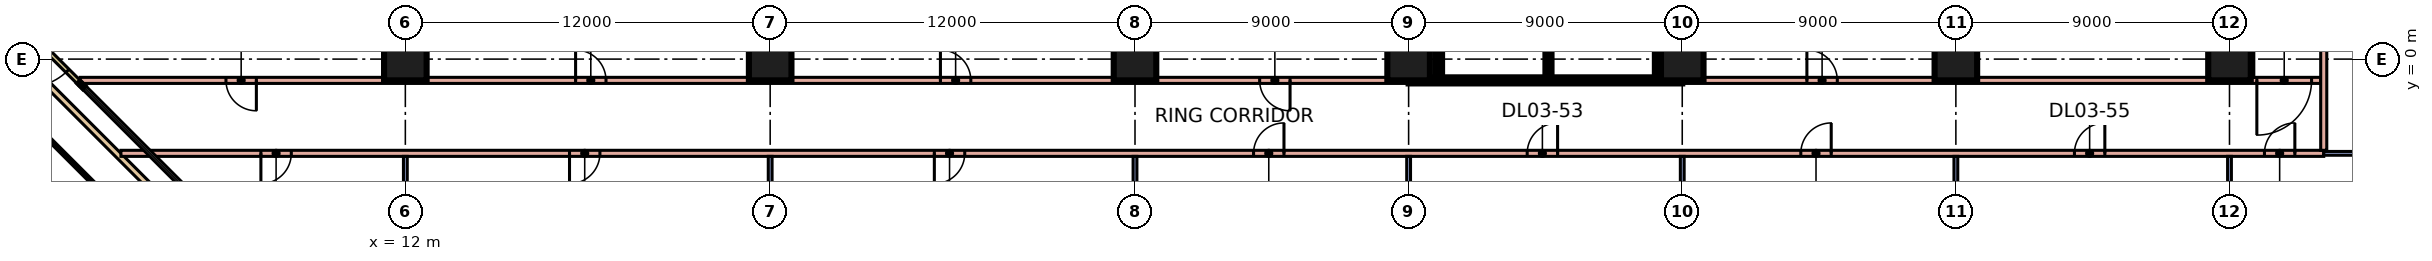
"""IFC4 building model, lengths in metres.
Left out: names, types, materials, properties, quantities, classifications, styles, units other than length and angle.
Written with IfcOpenShell. Run it as: python <this file> out.ifc"""

import sys

from ifc_helpers import new_model, si_unit, direction, frame, frame_2d, origin, origin_2d, place, context, subcontext, project, spatial, rectangle, extrude, element, fill, save


model = new_model("IFC4")
c1 = context("Model", 3, precision=1e-05, world=origin(), true_north=direction((0.0, 1.0)))
c2 = subcontext(c1, "Body", "Model", "MODEL_VIEW")
j1 = project(units=[si_unit("LENGTHUNIT", "METRE"), si_unit("PLANEANGLEUNIT", "RADIAN")], contexts=[c1])
p1 = place(None, origin())
s1 = spatial("IfcSite", under=j1, at=p1, CompositionType="ELEMENT")
p2 = place(p1, origin())
s2 = spatial("IfcBuilding", under=s1, at=p2, CompositionType="ELEMENT")
p3 = place(p2, frame((0.0, 0.0, 16.8)))
s3 = spatial("IfcBuildingStorey", under=s2, at=p3, CompositionType="ELEMENT", Elevation=16.8)
for number, where, z_axis, x_axis in (
    (1, (12.0, 0.0, 0.0), (0.0, 0.0, 1.0), (1.0, 0.0, 0.0)),
    (2, (24.0, 0.0, 0.0), (0.0, 0.0, 1.0), (1.0, 0.0, 0.0)),
    (3, (36.0, 0.0, 0.0), (0.0, 0.0, 1.0), (1.0, 0.0, 0.0)),
    (4, (45.0, 0.0, 0.0), (0.0, 0.0, 1.0), (1.0, 0.0, 0.0)),
    (5, (54.0, 0.0, 0.0), (0.0, 0.0, 1.0), (1.0, 0.0, 0.0)),
    (6, (63.0, 0.0, 0.0), (0.0, 0.0, 1.0), (1.0, 0.0, 0.0)),
    (7, (72.0, 0.0, 0.0), (0.0, 0.0, 1.0), (1.0, 0.0, 0.0)),
):
    element("IfcColumn", number, at=place(p3, frame(where, z_axis=z_axis, x_axis=x_axis)), inside=s3, PredefinedType="COLUMN", context=c2, shape_type="SweptSolid", body=[
        extrude(rectangle(XDim=1.4, YDim=1.4, at=origin_2d()), origin(), (0.0, 0.0, 1.0), 4.8),
    ])
p4 = place(p3, frame((-0.811, 1.31, 0.0), z_axis=(0.0, 0.0, 1.0), x_axis=(0.707106781187, -0.707106781187, 0.0)))
e8 = element("IfcWall", 8, at=p4, inside=s3, PredefinedType="SOLIDWALL", context=c2, shape_type="SweptSolid", body=[
    extrude(rectangle(XDim=3.0, YDim=0.15, at=frame_2d((1.5, 0.0))), origin(), (0.0, 0.0, 1.0), 4.4),
])
p5 = place(p4, frame((0.6, 0.0, 0.0)))
e9 = element("IfcOpeningElement", 9, at=p5, cuts=e8, PredefinedType="OPENING", context=c2, shape_type="SweptSolid", body=[
    extrude(rectangle(XDim=1.8, YDim=2.4, at=frame_2d((0.9, 1.2))), frame((0.0, 0.085, 0.0), z_axis=(0.0, -1.0, 0.0), x_axis=(1.0, 0.0, 0.0)), (0.0, 0.0, 1.0), 0.17),
])
p6 = place(p3, frame((81.7, -1.896, 0.0), z_axis=(0.0, 0.0, 1.0), x_axis=(-0.707106781187, -0.707106781187, 0.0)))
e10 = element("IfcWall", 10, at=p6, inside=s3, PredefinedType="PARAPET", context=c2, shape_type="SweptSolid", body=[
    extrude(rectangle(XDim=11.036, YDim=0.2, at=frame_2d((5.518, 0.0))), origin(), (0.0, 0.0, 1.0), 0.5),
])
p7 = place(p3, frame((9.104, -9.7, 0.0), z_axis=(0.0, 0.0, 1.0), x_axis=(-0.707106781187, 0.707106781187, 0.0)))
e11 = element("IfcWall", 11, at=p7, inside=s3, PredefinedType="PARAPET", context=c2, shape_type="SweptSolid", body=[
    extrude(rectangle(XDim=26.592, YDim=0.2, at=frame_2d((13.296, 0.0))), origin(), (0.0, 0.0, 1.0), 0.5),
])
p8 = place(p3, frame((1.304, -0.7, 0.0), z_axis=(0.0, 0.0, 1.0), x_axis=(1.0, 0.0, 0.0)))
e12 = element("IfcWall", 12, at=p8, inside=s3, PredefinedType="PARTITIONING", context=c2, shape_type="SweptSolid", body=[
    extrude(rectangle(XDim=43.696, YDim=0.2, at=frame_2d((21.848, 0.0))), origin(), (0.0, 0.0, 1.0), 4.4),
])
p9 = place(p8, frame((38.796, 0.0, 0.0)))
e13 = element("IfcOpeningElement", 13, at=p9, cuts=e12, PredefinedType="OPENING", context=c2, shape_type="SweptSolid", body=[
    extrude(rectangle(XDim=1.0, YDim=2.1, at=frame_2d((0.5, 1.05))), frame((0.0, 0.11, 0.0), z_axis=(0.0, -1.0, 0.0), x_axis=(1.0, 0.0, 0.0)), (0.0, 0.0, 1.0), 0.22),
])
p10 = place(p8, frame((4.796, 0.0, 0.0)))
e14 = element("IfcOpeningElement", 14, at=p10, cuts=e12, PredefinedType="OPENING", context=c2, shape_type="SweptSolid", body=[
    extrude(rectangle(XDim=1.0, YDim=2.1, at=frame_2d((0.5, 1.05))), frame((0.0, 0.11, 0.0), z_axis=(0.0, -1.0, 0.0), x_axis=(1.0, 0.0, 0.0)), (0.0, 0.0, 1.0), 0.22),
])
p11 = place(p8, frame((16.296, 0.0, 0.0)))
e15 = element("IfcOpeningElement", 15, at=p11, cuts=e12, PredefinedType="OPENING", context=c2, shape_type="SweptSolid", body=[
    extrude(rectangle(XDim=1.0, YDim=2.1, at=frame_2d((0.5, 1.05))), frame((0.0, 0.11, 0.0), z_axis=(0.0, -1.0, 0.0), x_axis=(1.0, 0.0, 0.0)), (0.0, 0.0, 1.0), 0.22),
])
p12 = place(p8, frame((28.296, 0.0, 0.0)))
e16 = element("IfcOpeningElement", 16, at=p12, cuts=e12, PredefinedType="OPENING", context=c2, shape_type="SweptSolid", body=[
    extrude(rectangle(XDim=1.0, YDim=2.1, at=frame_2d((0.5, 1.05))), frame((0.0, 0.11, 0.0), z_axis=(0.0, -1.0, 0.0), x_axis=(1.0, 0.0, 0.0)), (0.0, 0.0, 1.0), 0.22),
])
p13 = place(p3, frame((2.645, -3.1, 0.0), z_axis=(0.0, 0.0, 1.0), x_axis=(1.0, 0.0, 0.0)))
e17 = element("IfcWall", 17, at=p13, inside=s3, PredefinedType="PARTITIONING", context=c2, shape_type="SweptSolid", body=[
    extrude(rectangle(XDim=72.455, YDim=0.2, at=frame_2d((36.228, 0.0))), origin(), (0.0, 0.0, 1.0), 4.4),
])
p14 = place(p13, frame((4.604, 0.0, 0.0)))
e18 = element("IfcOpeningElement", 18, at=p14, cuts=e17, PredefinedType="OPENING", context=c2, shape_type="SweptSolid", body=[
    extrude(rectangle(XDim=1.0, YDim=2.1, at=frame_2d((0.5, 1.05))), frame((0.0, 0.11, 0.0), z_axis=(0.0, -1.0, 0.0), x_axis=(1.0, 0.0, 0.0)), (0.0, 0.0, 1.0), 0.22),
])
p15 = place(p13, frame((14.755, 0.0, 0.0)))
e19 = element("IfcOpeningElement", 19, at=p15, cuts=e17, PredefinedType="OPENING", context=c2, shape_type="SweptSolid", body=[
    extrude(rectangle(XDim=1.0, YDim=2.1, at=frame_2d((0.5, 1.05))), frame((0.0, 0.11, 0.0), z_axis=(0.0, -1.0, 0.0), x_axis=(1.0, 0.0, 0.0)), (0.0, 0.0, 1.0), 0.22),
])
p16 = place(p13, frame((26.755, 0.0, 0.0)))
e20 = element("IfcOpeningElement", 20, at=p16, cuts=e17, PredefinedType="OPENING", context=c2, shape_type="SweptSolid", body=[
    extrude(rectangle(XDim=1.0, YDim=2.1, at=frame_2d((0.5, 1.05))), frame((0.0, 0.11, 0.0), z_axis=(0.0, -1.0, 0.0), x_axis=(1.0, 0.0, 0.0)), (0.0, 0.0, 1.0), 0.22),
])
p17 = place(p13, frame((37.255, 0.0, 0.0)))
e21 = element("IfcOpeningElement", 21, at=p17, cuts=e17, PredefinedType="OPENING", context=c2, shape_type="SweptSolid", body=[
    extrude(rectangle(XDim=1.0, YDim=2.1, at=frame_2d((0.5, 1.05))), frame((0.0, 0.11, 0.0), z_axis=(0.0, -1.0, 0.0), x_axis=(1.0, 0.0, 0.0)), (0.0, 0.0, 1.0), 0.22),
])
p18 = place(p13, frame((46.255, 0.0, 0.0)))
e22 = element("IfcOpeningElement", 22, at=p18, cuts=e17, PredefinedType="OPENING", context=c2, shape_type="SweptSolid", body=[
    extrude(rectangle(XDim=1.0, YDim=2.1, at=frame_2d((0.5, 1.05))), frame((0.0, 0.11, 0.0), z_axis=(0.0, -1.0, 0.0), x_axis=(1.0, 0.0, 0.0)), (0.0, 0.0, 1.0), 0.22),
])
p19 = place(p13, frame((55.255, 0.0, 0.0)))
e23 = element("IfcOpeningElement", 23, at=p19, cuts=e17, PredefinedType="OPENING", context=c2, shape_type="SweptSolid", body=[
    extrude(rectangle(XDim=1.0, YDim=2.1, at=frame_2d((0.5, 1.05))), frame((0.0, 0.11, 0.0), z_axis=(0.0, -1.0, 0.0), x_axis=(1.0, 0.0, 0.0)), (0.0, 0.0, 1.0), 0.22),
])
p20 = place(p13, frame((64.255, 0.0, 0.0)))
e24 = element("IfcOpeningElement", 24, at=p20, cuts=e17, PredefinedType="OPENING", context=c2, shape_type="SweptSolid", body=[
    extrude(rectangle(XDim=1.0, YDim=2.1, at=frame_2d((0.5, 1.05))), frame((0.0, 0.11, 0.0), z_axis=(0.0, -1.0, 0.0), x_axis=(1.0, 0.0, 0.0)), (0.0, 0.0, 1.0), 0.22),
])
p21 = place(p13, frame((70.505, 0.0, 0.0)))
e25 = element("IfcOpeningElement", 25, at=p21, cuts=e17, PredefinedType="OPENING", context=c2, shape_type="SweptSolid", body=[
    extrude(rectangle(XDim=1.0, YDim=2.1, at=frame_2d((0.5, 1.05))), frame((0.0, 0.11, 0.0), z_axis=(0.0, -1.0, 0.0), x_axis=(1.0, 0.0, 0.0)), (0.0, 0.0, 1.0), 0.22),
])
p22 = place(p3, frame((12.0, -9.6, 0.0), z_axis=(0.0, 0.0, 1.0), x_axis=(0.0, 1.0, 0.0)))
e26 = element("IfcWall", 26, at=p22, inside=s3, PredefinedType="PARTITIONING", context=c2, shape_type="SweptSolid", body=[
    extrude(rectangle(XDim=6.4, YDim=0.125, at=frame_2d((3.2, 0.0))), origin(), (0.0, 0.0, 1.0), 4.4),
])
p23 = place(p3, frame((12.0, -0.6, 0.0), z_axis=(0.0, 0.0, 1.0), x_axis=(0.0, 1.0, 0.0)))
e27 = element("IfcWall", 27, at=p23, inside=s3, PredefinedType="PARTITIONING", context=c2, shape_type="SweptSolid", body=[
    extrude(rectangle(XDim=7.6, YDim=0.125, at=frame_2d((3.8, 0.0))), origin(), (0.0, 0.0, 1.0), 4.4),
])
p24 = place(p3, frame((24.0, -9.6, 0.0), z_axis=(0.0, 0.0, 1.0), x_axis=(0.0, 1.0, 0.0)))
e28 = element("IfcWall", 28, at=p24, inside=s3, PredefinedType="PARTITIONING", context=c2, shape_type="SweptSolid", body=[
    extrude(rectangle(XDim=6.4, YDim=0.125, at=frame_2d((3.2, 0.0))), origin(), (0.0, 0.0, 1.0), 4.4),
])
p25 = place(p3, frame((24.0, -0.6, 0.0), z_axis=(0.0, 0.0, 1.0), x_axis=(0.0, 1.0, 0.0)))
e29 = element("IfcWall", 29, at=p25, inside=s3, PredefinedType="PARTITIONING", context=c2, shape_type="SweptSolid", body=[
    extrude(rectangle(XDim=7.6, YDim=0.125, at=frame_2d((3.8, 0.0))), origin(), (0.0, 0.0, 1.0), 4.4),
])
p26 = place(p3, frame((36.0, -8.851, 0.0), z_axis=(0.0, 0.0, 1.0), x_axis=(0.0, 1.0, 0.0)))
e30 = element("IfcWall", 30, at=p26, inside=s3, PredefinedType="PARTITIONING", context=c2, shape_type="SweptSolid", body=[
    extrude(rectangle(XDim=5.651, YDim=0.125, at=frame_2d((2.826, 0.0))), origin(), (0.0, 0.0, 1.0), 4.4),
])
p27 = place(p3, frame((36.0, -0.6, 0.0), z_axis=(0.0, 0.0, 1.0), x_axis=(0.0, 1.0, 0.0)))
e31 = element("IfcWall", 31, at=p27, inside=s3, PredefinedType="PARTITIONING", context=c2, shape_type="SweptSolid", body=[
    extrude(rectangle(XDim=6.662, YDim=0.125, at=frame_2d((3.331, 0.0))), origin(), (0.0, 0.0, 1.0), 4.4),
])
p28 = place(p3, frame((45.0, -9.6, 0.0), z_axis=(0.0, 0.0, 1.0), x_axis=(0.0, 1.0, 0.0)))
e32 = element("IfcWall", 32, at=p28, inside=s3, PredefinedType="PARTITIONING", context=c2, shape_type="SweptSolid", body=[
    extrude(rectangle(XDim=6.4, YDim=0.125, at=frame_2d((3.2, 0.0))), origin(), (0.0, 0.0, 1.0), 4.4),
])
p29 = place(p3, frame((45.0, -0.7, 0.0), z_axis=(0.0, 0.0, 1.0), x_axis=(1.0, 0.0, 0.0)))
e33 = element("IfcWall", 33, at=p29, inside=s3, PredefinedType="SOLIDWALL", context=c2, shape_type="SweptSolid", body=[
    extrude(rectangle(XDim=9.0, YDim=0.2, at=frame_2d((4.5, 0.0))), origin(), (0.0, 0.0, 1.0), 4.4),
])
for number, where, z_axis, x_axis in (
    (34, (45.0, -0.6, 0.0), (0.0, 0.0, 1.0), (0.0, 1.0, 0.0)),
    (35, (49.6, -0.6, 0.0), (0.0, 0.0, 1.0), (0.0, 1.0, 0.0)),
):
    element("IfcWall", number, at=place(p3, frame(where, z_axis=z_axis, x_axis=x_axis)), inside=s3, PredefinedType="SOLIDWALL", context=c2, shape_type="SweptSolid", body=[
        extrude(rectangle(XDim=13.1, YDim=0.2, at=frame_2d((6.55, 0.0))), origin(), (0.0, 0.0, 1.0), 4.4),
    ])
p30 = place(p3, frame((54.0, -9.6, 0.0), z_axis=(0.0, 0.0, 1.0), x_axis=(0.0, 1.0, 0.0)))
e36 = element("IfcWall", 36, at=p30, inside=s3, PredefinedType="PARTITIONING", context=c2, shape_type="SweptSolid", body=[
    extrude(rectangle(XDim=6.4, YDim=0.125, at=frame_2d((3.2, 0.0))), origin(), (0.0, 0.0, 1.0), 4.4),
])
p31 = place(p3, frame((54.0, -0.7, 0.0), z_axis=(0.0, 0.0, 1.0), x_axis=(1.0, 0.0, 0.0)))
e37 = element("IfcWall", 37, at=p31, inside=s3, PredefinedType="PARTITIONING", context=c2, shape_type="SweptSolid", body=[
    extrude(rectangle(XDim=21.0, YDim=0.2, at=frame_2d((10.5, 0.0))), origin(), (0.0, 0.0, 1.0), 4.4),
])
p32 = place(p31, frame((4.1, 0.0, 0.0)))
e38 = element("IfcOpeningElement", 38, at=p32, cuts=e37, PredefinedType="OPENING", context=c2, shape_type="SweptSolid", body=[
    extrude(rectangle(XDim=1.0, YDim=2.1, at=frame_2d((0.5, 1.05))), frame((0.0, 0.11, 0.0), z_axis=(0.0, -1.0, 0.0), x_axis=(1.0, 0.0, 0.0)), (0.0, 0.0, 1.0), 0.22),
])
p33 = place(p31, frame((18.9, 0.0, 0.0)))
e39 = element("IfcOpeningElement", 39, at=p33, cuts=e37, PredefinedType="OPENING", context=c2, shape_type="SweptSolid", body=[
    extrude(rectangle(XDim=1.8, YDim=2.1, at=frame_2d((0.9, 1.05))), frame((0.0, 0.11, 0.0), z_axis=(0.0, -1.0, 0.0), x_axis=(1.0, 0.0, 0.0)), (0.0, 0.0, 1.0), 0.22),
])
p34 = place(p3, frame((54.0, -0.6, 0.0), z_axis=(0.0, 0.0, 1.0), x_axis=(0.0, 1.0, 0.0)))
e40 = element("IfcWall", 40, at=p34, inside=s3, PredefinedType="SOLIDWALL", context=c2, shape_type="SweptSolid", body=[
    extrude(rectangle(XDim=13.1, YDim=0.2, at=frame_2d((6.55, 0.0))), origin(), (0.0, 0.0, 1.0), 4.4),
])
p35 = place(p3, frame((63.0, -8.851, 0.0), z_axis=(0.0, 0.0, 1.0), x_axis=(0.0, 1.0, 0.0)))
e41 = element("IfcWall", 41, at=p35, inside=s3, PredefinedType="PARTITIONING", context=c2, shape_type="SweptSolid", body=[
    extrude(rectangle(XDim=5.651, YDim=0.125, at=frame_2d((2.826, 0.0))), origin(), (0.0, 0.0, 1.0), 4.4),
])
p36 = place(p3, frame((63.0, -0.6, 0.0), z_axis=(0.0, 0.0, 1.0), x_axis=(0.0, 1.0, 0.0)))
e42 = element("IfcWall", 42, at=p36, inside=s3, PredefinedType="PARTITIONING", context=c2, shape_type="SweptSolid", body=[
    extrude(rectangle(XDim=6.538, YDim=0.125, at=frame_2d((3.269, 0.0))), origin(), (0.0, 0.0, 1.0), 4.4),
])
p37 = place(p3, frame((72.0, -9.6, 0.0), z_axis=(0.0, 0.0, 1.0), x_axis=(0.0, 1.0, 0.0)))
e43 = element("IfcWall", 43, at=p37, inside=s3, PredefinedType="PARTITIONING", context=c2, shape_type="SweptSolid", body=[
    extrude(rectangle(XDim=6.4, YDim=0.125, at=frame_2d((3.2, 0.0))), origin(), (0.0, 0.0, 1.0), 4.4),
])
p38 = place(p3, frame((72.7, -0.6, 0.0), z_axis=(0.0, 0.0, 1.0), x_axis=(0.0, 1.0, 0.0)))
e44 = element("IfcWall", 44, at=p38, inside=s3, PredefinedType="PARTITIONING", context=c2, shape_type="SweptSolid", body=[
    extrude(rectangle(XDim=13.1, YDim=0.2, at=frame_2d((6.55, 0.0))), origin(), (0.0, 0.0, 1.0), 4.4),
])
p39 = place(p38, frame((6.05, 0.0, 0.0)))
e45 = element("IfcOpeningElement", 45, at=p39, cuts=e44, PredefinedType="OPENING", context=c2, shape_type="SweptSolid", body=[
    extrude(rectangle(XDim=1.0, YDim=2.1, at=frame_2d((0.5, 1.05))), frame((0.0, 0.11, 0.0), z_axis=(0.0, -1.0, 0.0), x_axis=(1.0, 0.0, 0.0)), (0.0, 0.0, 1.0), 0.22),
])
p40 = place(p3, frame((75.1, -3.1, 0.0), z_axis=(0.0, 0.0, 1.0), x_axis=(1.0, 0.0, 0.0)))
e46 = element("IfcWall", 46, at=p40, inside=s3, PredefinedType="PARTITIONING", context=c2, shape_type="SweptSolid", body=[
    extrude(rectangle(XDim=5.255, YDim=0.125, at=frame_2d((2.627, 0.0))), origin(), (0.0, 0.0, 1.0), 4.4),
])
p41 = place(p3, frame((75.1, -3.0, 0.0), z_axis=(0.0, 0.0, 1.0), x_axis=(0.0, 1.0, 0.0)))
e47 = element("IfcWall", 47, at=p41, inside=s3, PredefinedType="PARTITIONING", context=c2, shape_type="SweptSolid", body=[
    extrude(rectangle(XDim=30.0, YDim=0.2, at=frame_2d((15.0, 0.0))), origin(), (0.0, 0.0, 1.0), 4.4),
])
p42 = place(p41, frame((8.4, 0.0, 0.0)))
e48 = element("IfcOpeningElement", 48, at=p42, cuts=e47, PredefinedType="OPENING", context=c2, shape_type="SweptSolid", body=[
    extrude(rectangle(XDim=1.0, YDim=2.1, at=frame_2d((0.5, 1.05))), frame((0.0, 0.11, 0.0), z_axis=(0.0, -1.0, 0.0), x_axis=(1.0, 0.0, 0.0)), (0.0, 0.0, 1.0), 0.22),
])
p43 = place(p41, frame((22.25, 0.0, 0.0)))
e49 = element("IfcOpeningElement", 49, at=p43, cuts=e47, PredefinedType="OPENING", context=c2, shape_type="SweptSolid", body=[
    extrude(rectangle(XDim=1.0, YDim=2.1, at=frame_2d((0.5, 1.05))), frame((0.0, 0.11, 0.0), z_axis=(0.0, -1.0, 0.0), x_axis=(1.0, 0.0, 0.0)), (0.0, 0.0, 1.0), 0.22),
])
for number, where, z_axis, x_axis in (
    (50, (53.2, -0.6, 0.0), (0.0, 0.0, 1.0), (0.0, 1.0, 0.0)),
    (51, (46.0, -0.6, 0.0), (0.0, 0.0, 1.0), (0.0, 1.0, 0.0)),
):
    element("IfcWall", number, at=place(p3, frame(where, z_axis=z_axis, x_axis=x_axis)), inside=s3, PredefinedType="SOLIDWALL", context=c2, shape_type="SweptSolid", body=[
        extrude(rectangle(XDim=7.945, YDim=0.2, at=frame_2d((3.973, 0.0))), origin(), (0.0, 0.0, 1.0), 4.4),
    ])
p44 = place(p5, frame((1.8, 0.0, 0.0), z_axis=(0.0, 0.0, 1.0), x_axis=(-1.0, 0.0, 0.0)))
e52 = element("IfcDoor", 52, at=p44, inside=s3, OperationType="DOUBLE_DOOR_SINGLE_SWING", PredefinedType="DOOR", context=c2, shape_type="SweptSolid", body=[
    extrude(rectangle(XDim=1.8, YDim=2.4, at=frame_2d((0.9, 1.2))), frame((0.0, 0.025, 0.0), z_axis=(0.0, -1.0, 0.0), x_axis=(1.0, 0.0, 0.0)), (0.0, 0.0, 1.0), 0.05),
])
fill(e9, e52)
p45 = place(p9, origin())
e53 = element("IfcDoor", 53, at=p45, inside=s3, OperationType="SINGLE_SWING_RIGHT", PredefinedType="DOOR", context=c2, shape_type="SweptSolid", body=[
    extrude(rectangle(XDim=1.0, YDim=2.1, at=frame_2d((0.5, 1.05))), frame((0.0, 0.025, 0.0), z_axis=(0.0, -1.0, 0.0), x_axis=(1.0, 0.0, 0.0)), (0.0, 0.0, 1.0), 0.05),
])
fill(e13, e53)
p46 = place(p32, origin())
e54 = element("IfcDoor", 54, at=p46, inside=s3, OperationType="SINGLE_SWING_LEFT", PredefinedType="DOOR", context=c2, shape_type="SweptSolid", body=[
    extrude(rectangle(XDim=1.0, YDim=2.1, at=frame_2d((0.5, 1.05))), frame((0.0, 0.025, 0.0), z_axis=(0.0, -1.0, 0.0), x_axis=(1.0, 0.0, 0.0)), (0.0, 0.0, 1.0), 0.05),
])
fill(e38, e54)
p47 = place(p33, frame((1.8, 0.0, 0.0), z_axis=(0.0, 0.0, 1.0), x_axis=(-1.0, 0.0, 0.0)))
e55 = element("IfcDoor", 55, at=p47, inside=s3, OperationType="DOUBLE_DOOR_SINGLE_SWING", PredefinedType="DOOR", context=c2, shape_type="SweptSolid", body=[
    extrude(rectangle(XDim=1.8, YDim=2.1, at=frame_2d((0.9, 1.05))), frame((0.0, 0.025, 0.0), z_axis=(0.0, -1.0, 0.0), x_axis=(1.0, 0.0, 0.0)), (0.0, 0.0, 1.0), 0.05),
])
fill(e39, e55)
p48 = place(p10, origin())
e56 = element("IfcDoor", 56, at=p48, inside=s3, OperationType="SINGLE_SWING_RIGHT", PredefinedType="DOOR", context=c2, shape_type="SweptSolid", body=[
    extrude(rectangle(XDim=1.0, YDim=2.1, at=frame_2d((0.5, 1.05))), frame((0.0, 0.025, 0.0), z_axis=(0.0, -1.0, 0.0), x_axis=(1.0, 0.0, 0.0)), (0.0, 0.0, 1.0), 0.05),
])
fill(e14, e56)
p49 = place(p11, origin())
e57 = element("IfcDoor", 57, at=p49, inside=s3, OperationType="SINGLE_SWING_LEFT", PredefinedType="DOOR", context=c2, shape_type="SweptSolid", body=[
    extrude(rectangle(XDim=1.0, YDim=2.1, at=frame_2d((0.5, 1.05))), frame((0.0, 0.025, 0.0), z_axis=(0.0, -1.0, 0.0), x_axis=(1.0, 0.0, 0.0)), (0.0, 0.0, 1.0), 0.05),
])
fill(e15, e57)
p50 = place(p12, origin())
e58 = element("IfcDoor", 58, at=p50, inside=s3, OperationType="SINGLE_SWING_LEFT", PredefinedType="DOOR", context=c2, shape_type="SweptSolid", body=[
    extrude(rectangle(XDim=1.0, YDim=2.1, at=frame_2d((0.5, 1.05))), frame((0.0, 0.025, 0.0), z_axis=(0.0, -1.0, 0.0), x_axis=(1.0, 0.0, 0.0)), (0.0, 0.0, 1.0), 0.05),
])
fill(e16, e58)
p51 = place(p14, frame((1.0, 0.0, 0.0), z_axis=(0.0, 0.0, 1.0), x_axis=(-1.0, 0.0, 0.0)))
e59 = element("IfcDoor", 59, at=p51, inside=s3, OperationType="SINGLE_SWING_LEFT", PredefinedType="DOOR", context=c2, shape_type="SweptSolid", body=[
    extrude(rectangle(XDim=1.0, YDim=2.1, at=frame_2d((0.5, 1.05))), frame((0.0, 0.025, 0.0), z_axis=(0.0, -1.0, 0.0), x_axis=(1.0, 0.0, 0.0)), (0.0, 0.0, 1.0), 0.05),
])
fill(e18, e59)
p52 = place(p15, frame((1.0, 0.0, 0.0), z_axis=(0.0, 0.0, 1.0), x_axis=(-1.0, 0.0, 0.0)))
e60 = element("IfcDoor", 60, at=p52, inside=s3, OperationType="SINGLE_SWING_LEFT", PredefinedType="DOOR", context=c2, shape_type="SweptSolid", body=[
    extrude(rectangle(XDim=1.0, YDim=2.1, at=frame_2d((0.5, 1.05))), frame((0.0, 0.025, 0.0), z_axis=(0.0, -1.0, 0.0), x_axis=(1.0, 0.0, 0.0)), (0.0, 0.0, 1.0), 0.05),
])
fill(e19, e60)
p53 = place(p16, frame((1.0, 0.0, 0.0), z_axis=(0.0, 0.0, 1.0), x_axis=(-1.0, 0.0, 0.0)))
e61 = element("IfcDoor", 61, at=p53, inside=s3, OperationType="SINGLE_SWING_LEFT", PredefinedType="DOOR", context=c2, shape_type="SweptSolid", body=[
    extrude(rectangle(XDim=1.0, YDim=2.1, at=frame_2d((0.5, 1.05))), frame((0.0, 0.025, 0.0), z_axis=(0.0, -1.0, 0.0), x_axis=(1.0, 0.0, 0.0)), (0.0, 0.0, 1.0), 0.05),
])
fill(e20, e61)
p54 = place(p17, frame((1.0, 0.0, 0.0), z_axis=(0.0, 0.0, 1.0), x_axis=(-1.0, 0.0, 0.0)))
e62 = element("IfcDoor", 62, at=p54, inside=s3, OperationType="SINGLE_SWING_RIGHT", PredefinedType="DOOR", context=c2, shape_type="SweptSolid", body=[
    extrude(rectangle(XDim=1.0, YDim=2.1, at=frame_2d((0.5, 1.05))), frame((0.0, 0.025, 0.0), z_axis=(0.0, -1.0, 0.0), x_axis=(1.0, 0.0, 0.0)), (0.0, 0.0, 1.0), 0.05),
])
fill(e21, e62)
p55 = place(p18, frame((1.0, 0.0, 0.0), z_axis=(0.0, 0.0, 1.0), x_axis=(-1.0, 0.0, 0.0)))
e63 = element("IfcDoor", 63, at=p55, inside=s3, OperationType="SINGLE_SWING_RIGHT", PredefinedType="DOOR", context=c2, shape_type="SweptSolid", body=[
    extrude(rectangle(XDim=1.0, YDim=2.1, at=frame_2d((0.5, 1.05))), frame((0.0, 0.025, 0.0), z_axis=(0.0, -1.0, 0.0), x_axis=(1.0, 0.0, 0.0)), (0.0, 0.0, 1.0), 0.05),
])
fill(e22, e63)
p56 = place(p19, frame((1.0, 0.0, 0.0), z_axis=(0.0, 0.0, 1.0), x_axis=(-1.0, 0.0, 0.0)))
e64 = element("IfcDoor", 64, at=p56, inside=s3, OperationType="SINGLE_SWING_RIGHT", PredefinedType="DOOR", context=c2, shape_type="SweptSolid", body=[
    extrude(rectangle(XDim=1.0, YDim=2.1, at=frame_2d((0.5, 1.05))), frame((0.0, 0.025, 0.0), z_axis=(0.0, -1.0, 0.0), x_axis=(1.0, 0.0, 0.0)), (0.0, 0.0, 1.0), 0.05),
])
fill(e23, e64)
p57 = place(p20, frame((1.0, 0.0, 0.0), z_axis=(0.0, 0.0, 1.0), x_axis=(-1.0, 0.0, 0.0)))
e65 = element("IfcDoor", 65, at=p57, inside=s3, OperationType="SINGLE_SWING_RIGHT", PredefinedType="DOOR", context=c2, shape_type="SweptSolid", body=[
    extrude(rectangle(XDim=1.0, YDim=2.1, at=frame_2d((0.5, 1.05))), frame((0.0, 0.025, 0.0), z_axis=(0.0, -1.0, 0.0), x_axis=(1.0, 0.0, 0.0)), (0.0, 0.0, 1.0), 0.05),
])
fill(e24, e65)
p58 = place(p21, frame((1.0, 0.0, 0.0), z_axis=(0.0, 0.0, 1.0), x_axis=(-1.0, 0.0, 0.0)))
e66 = element("IfcDoor", 66, at=p58, inside=s3, OperationType="SINGLE_SWING_RIGHT", PredefinedType="DOOR", context=c2, shape_type="SweptSolid", body=[
    extrude(rectangle(XDim=1.0, YDim=2.1, at=frame_2d((0.5, 1.05))), frame((0.0, 0.025, 0.0), z_axis=(0.0, -1.0, 0.0), x_axis=(1.0, 0.0, 0.0)), (0.0, 0.0, 1.0), 0.05),
])
fill(e25, e66)
save(model, sys.argv[1])
